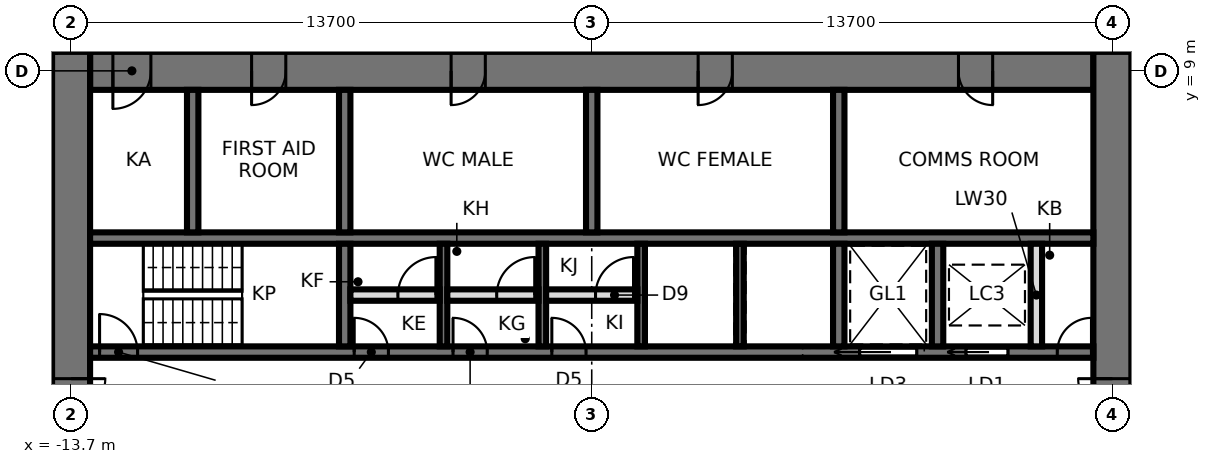
"""IFC4 building model, lengths in metres.
Left out: names, types, materials, properties, quantities, classifications, styles, units other than length and angle.
Written with IfcOpenShell. Run it as: python <this file> out.ifc"""

import sys

from ifc_helpers import new_model, si_unit, direction, frame, frame_2d, origin, place, context, subcontext, project, spatial, rectangle, extrude, element, fill, save


model = new_model("IFC4")
c1 = context("Model", 3, precision=1e-05, world=origin(), true_north=direction((0.0, 1.0)))
c2 = subcontext(c1, "Body", "Model", "MODEL_VIEW")
j1 = project(units=[si_unit("LENGTHUNIT", "METRE"), si_unit("PLANEANGLEUNIT", "RADIAN")], contexts=[c1])
p1 = place(None, origin())
s1 = spatial("IfcSite", under=j1, at=p1, CompositionType="ELEMENT")
p2 = place(p1, origin())
s2 = spatial("IfcBuilding", under=s1, at=p2, CompositionType="ELEMENT")
p3 = place(p2, frame((0.0, 0.0, 207.2)))
s3 = spatial("IfcBuildingStorey", under=s2, at=p3, CompositionType="ELEMENT", Elevation=207.2)
p4 = place(p3, frame((13.2, 9.0, 0.0), z_axis=(0.0, 0.0, 1.0), x_axis=(-1.0, 0.0, 0.0)))
e1 = element("IfcWall", 1, at=p4, inside=s3, PredefinedType="SHEAR", context=c2, shape_type="SweptSolid", body=[
    extrude(rectangle(XDim=26.4, YDim=1.0, at=frame_2d((13.2, 0.0))), origin(), (0.0, 0.0, 1.0), 3.9),
])
p5 = place(p4, frame((2.65, 0.0, 0.0)))
e2 = element("IfcOpeningElement", 2, at=p5, cuts=e1, PredefinedType="OPENING", context=c2, shape_type="SweptSolid", body=[
    extrude(rectangle(XDim=0.9, YDim=2.1, at=frame_2d((0.45, 1.05))), frame((0.0, 0.51, 0.0), z_axis=(0.0, -1.0, 0.0), x_axis=(1.0, 0.0, 0.0)), (0.0, 0.0, 1.0), 1.02),
])
p6 = place(p4, frame((9.5, 0.0, 0.0)))
e3 = element("IfcOpeningElement", 3, at=p6, cuts=e1, PredefinedType="OPENING", context=c2, shape_type="SweptSolid", body=[
    extrude(rectangle(XDim=0.9, YDim=2.1, at=frame_2d((0.45, 1.05))), frame((0.0, 0.51, 0.0), z_axis=(0.0, -1.0, 0.0), x_axis=(1.0, 0.0, 0.0)), (0.0, 0.0, 1.0), 1.02),
])
p7 = place(p4, frame((16.0, 0.0, 0.0)))
e4 = element("IfcOpeningElement", 4, at=p7, cuts=e1, PredefinedType="OPENING", context=c2, shape_type="SweptSolid", body=[
    extrude(rectangle(XDim=0.9, YDim=2.1, at=frame_2d((0.45, 1.05))), frame((0.0, 0.51, 0.0), z_axis=(0.0, -1.0, 0.0), x_axis=(1.0, 0.0, 0.0)), (0.0, 0.0, 1.0), 1.02),
])
p8 = place(p4, frame((21.25, 0.0, 0.0)))
e5 = element("IfcOpeningElement", 5, at=p8, cuts=e1, PredefinedType="OPENING", context=c2, shape_type="SweptSolid", body=[
    extrude(rectangle(XDim=0.9, YDim=2.1, at=frame_2d((0.45, 1.05))), frame((0.0, 0.51, 0.0), z_axis=(0.0, -1.0, 0.0), x_axis=(1.0, 0.0, 0.0)), (0.0, 0.0, 1.0), 1.02),
])
p9 = place(p4, frame((24.8, 0.0, 0.0)))
e6 = element("IfcOpeningElement", 6, at=p9, cuts=e1, PredefinedType="OPENING", context=c2, shape_type="SweptSolid", body=[
    extrude(rectangle(XDim=1.0, YDim=2.1, at=frame_2d((0.5, 1.05))), frame((0.0, 0.51, 0.0), z_axis=(0.0, -1.0, 0.0), x_axis=(1.0, 0.0, 0.0)), (0.0, 0.0, 1.0), 1.02),
])
p10 = place(p3, frame((13.7, -9.5, 0.0), z_axis=(0.0, 0.0, 1.0), x_axis=(0.0, 1.0, 0.0)))
e7 = element("IfcWall", 7, at=p10, inside=s3, PredefinedType="SHEAR", context=c2, shape_type="SweptSolid", body=[
    extrude(rectangle(XDim=19.0, YDim=1.0, at=frame_2d((9.5, 0.0))), origin(), (0.0, 0.0, 1.0), 3.9),
])
p11 = place(p10, frame((8.6, 0.0, 0.0)))
e8 = element("IfcOpeningElement", 8, at=p11, cuts=e7, PredefinedType="OPENING", context=c2, shape_type="SweptSolid", body=[
    extrude(rectangle(XDim=1.8, YDim=2.4, at=frame_2d((0.9, 1.2))), frame((0.0, 0.51, 0.0), z_axis=(0.0, -1.0, 0.0), x_axis=(1.0, 0.0, 0.0)), (0.0, 0.0, 1.0), 1.02),
])
p12 = place(p3, frame((-13.7, 9.5, 0.0), z_axis=(0.0, 0.0, 1.0), x_axis=(0.0, -1.0, 0.0)))
e9 = element("IfcWall", 9, at=p12, inside=s3, PredefinedType="SHEAR", context=c2, shape_type="SweptSolid", body=[
    extrude(rectangle(XDim=19.0, YDim=1.0, at=frame_2d((9.5, 0.0))), origin(), (0.0, 0.0, 1.0), 3.9),
])
p13 = place(p12, frame((8.6, 0.0, 0.0)))
e10 = element("IfcOpeningElement", 10, at=p13, cuts=e9, PredefinedType="OPENING", context=c2, shape_type="SweptSolid", body=[
    extrude(rectangle(XDim=1.8, YDim=2.4, at=frame_2d((0.9, 1.2))), frame((0.0, 0.51, 0.0), z_axis=(0.0, -1.0, 0.0), x_axis=(1.0, 0.0, 0.0)), (0.0, 0.0, 1.0), 1.02),
])
p14 = place(p3, frame((-13.2, 1.6, 0.0), z_axis=(0.0, 0.0, 1.0), x_axis=(1.0, 0.0, 0.0)))
e11 = element("IfcWall", 11, at=p14, inside=s3, PredefinedType="SHEAR", context=c2, shape_type="SweptSolid", body=[
    extrude(rectangle(XDim=26.4, YDim=0.3, at=frame_2d((13.2, 0.0))), origin(), (0.0, 0.0, 1.0), 3.9),
])
p15 = place(p14, frame((0.25, 0.0, 0.0)))
e12 = element("IfcOpeningElement", 12, at=p15, cuts=e11, PredefinedType="OPENING", context=c2, shape_type="SweptSolid", body=[
    extrude(rectangle(XDim=1.0, YDim=2.1, at=frame_2d((0.5, 1.05))), frame((0.0, 0.16, 0.0), z_axis=(0.0, -1.0, 0.0), x_axis=(1.0, 0.0, 0.0)), (0.0, 0.0, 1.0), 0.32),
])
p16 = place(p14, frame((23.05, 0.0, 0.0)))
e13 = element("IfcOpeningElement", 13, at=p16, cuts=e11, PredefinedType="OPENING", context=c2, shape_type="SweptSolid", body=[
    extrude(rectangle(XDim=1.1, YDim=2.3, at=frame_2d((0.55, 1.15))), frame((0.0, 0.16, 0.0), z_axis=(0.0, -1.0, 0.0), x_axis=(1.0, 0.0, 0.0)), (0.0, 0.0, 1.0), 0.32),
])
p17 = place(p14, frame((20.25, 0.0, 0.0)))
e14 = element("IfcOpeningElement", 14, at=p17, cuts=e11, PredefinedType="OPENING", context=c2, shape_type="SweptSolid", body=[
    extrude(rectangle(XDim=1.5, YDim=2.4, at=frame_2d((0.75, 1.2))), frame((0.0, 0.16, 0.0), z_axis=(0.0, -1.0, 0.0), x_axis=(1.0, 0.0, 0.0)), (0.0, 0.0, 1.0), 0.32),
])
p18 = place(p14, frame((6.95, 0.0, 0.0)))
e15 = element("IfcOpeningElement", 15, at=p18, cuts=e11, PredefinedType="OPENING", context=c2, shape_type="SweptSolid", body=[
    extrude(rectangle(XDim=0.9, YDim=2.1, at=frame_2d((0.45, 1.05))), frame((0.0, 0.16, 0.0), z_axis=(0.0, -1.0, 0.0), x_axis=(1.0, 0.0, 0.0)), (0.0, 0.0, 1.0), 0.32),
])
p19 = place(p14, frame((9.55, 0.0, 0.0)))
e16 = element("IfcOpeningElement", 16, at=p19, cuts=e11, PredefinedType="OPENING", context=c2, shape_type="SweptSolid", body=[
    extrude(rectangle(XDim=0.9, YDim=2.1, at=frame_2d((0.45, 1.05))), frame((0.0, 0.16, 0.0), z_axis=(0.0, -1.0, 0.0), x_axis=(1.0, 0.0, 0.0)), (0.0, 0.0, 1.0), 0.32),
])
p20 = place(p14, frame((12.15, 0.0, 0.0)))
e17 = element("IfcOpeningElement", 17, at=p20, cuts=e11, PredefinedType="OPENING", context=c2, shape_type="SweptSolid", body=[
    extrude(rectangle(XDim=0.9, YDim=2.1, at=frame_2d((0.45, 1.05))), frame((0.0, 0.16, 0.0), z_axis=(0.0, -1.0, 0.0), x_axis=(1.0, 0.0, 0.0)), (0.0, 0.0, 1.0), 0.32),
])
p21 = place(p14, frame((25.45, 0.0, 0.0)))
e18 = element("IfcOpeningElement", 18, at=p21, cuts=e11, PredefinedType="OPENING", context=c2, shape_type="SweptSolid", body=[
    extrude(rectangle(XDim=0.9, YDim=2.1, at=frame_2d((0.45, 1.05))), frame((0.0, 0.16, 0.0), z_axis=(0.0, -1.0, 0.0), x_axis=(1.0, 0.0, 0.0)), (0.0, 0.0, 1.0), 0.32),
])
p22 = place(p3, frame((-13.2, 4.6, 0.0), z_axis=(0.0, 0.0, 1.0), x_axis=(1.0, 0.0, 0.0)))
e19 = element("IfcWall", 19, at=p22, inside=s3, PredefinedType="SHEAR", context=c2, shape_type="SweptSolid", body=[
    extrude(rectangle(XDim=26.4, YDim=0.3, at=frame_2d((13.2, 0.0))), origin(), (0.0, 0.0, 1.0), 3.9),
])
p23 = place(p3, frame((-6.5, 1.75, 0.0), z_axis=(0.0, 0.0, 1.0), x_axis=(0.0, 1.0, 0.0)))
e20 = element("IfcWall", 20, at=p23, inside=s3, PredefinedType="SHEAR", context=c2, shape_type="SweptSolid", body=[
    extrude(rectangle(XDim=2.7, YDim=0.3, at=frame_2d((1.35, 0.0))), origin(), (0.0, 0.0, 1.0), 3.9),
])
p24 = place(p3, frame((-6.5, 4.75, 0.0), z_axis=(0.0, 0.0, 1.0), x_axis=(0.0, 1.0, 0.0)))
e21 = element("IfcWall", 21, at=p24, inside=s3, PredefinedType="SHEAR", context=c2, shape_type="SweptSolid", body=[
    extrude(rectangle(XDim=3.75, YDim=0.3, at=frame_2d((1.875, 0.0))), origin(), (0.0, 0.0, 1.0), 3.9),
])
p25 = place(p3, frame((6.5, 1.75, 0.0), z_axis=(0.0, 0.0, 1.0), x_axis=(0.0, 1.0, 0.0)))
e22 = element("IfcWall", 22, at=p25, inside=s3, PredefinedType="SHEAR", context=c2, shape_type="SweptSolid", body=[
    extrude(rectangle(XDim=2.7, YDim=0.3, at=frame_2d((1.35, 0.0))), origin(), (0.0, 0.0, 1.0), 3.9),
])
p26 = place(p3, frame((6.5, 4.75, 0.0), z_axis=(0.0, 0.0, 1.0), x_axis=(0.0, 1.0, 0.0)))
e23 = element("IfcWall", 23, at=p26, inside=s3, PredefinedType="SHEAR", context=c2, shape_type="SweptSolid", body=[
    extrude(rectangle(XDim=3.75, YDim=0.3, at=frame_2d((1.875, 0.0))), origin(), (0.0, 0.0, 1.0), 3.9),
])
for number, where, z_axis, x_axis in (
    (24, (-3.9, 1.75, 0.0), (0.0, 0.0, 1.0), (0.0, 1.0, 0.0)),
    (25, (-1.3, 1.75, 0.0), (0.0, 0.0, 1.0), (0.0, 1.0, 0.0)),
    (26, (1.3, 1.75, 0.0), (0.0, 0.0, 1.0), (0.0, 1.0, 0.0)),
    (27, (3.9, 1.75, 0.0), (0.0, 0.0, 1.0), (0.0, 1.0, 0.0)),
):
    element("IfcWall", number, at=place(p3, frame(where, z_axis=z_axis, x_axis=x_axis)), inside=s3, PredefinedType="SHEAR", context=c2, shape_type="SweptSolid", body=[
        extrude(rectangle(XDim=2.7, YDim=0.2, at=frame_2d((1.35, 0.0))), origin(), (0.0, 0.0, 1.0), 3.9),
    ])
for number, where, z_axis, x_axis in (
    (28, (0.0, 4.75, 0.0), (0.0, 0.0, 1.0), (0.0, 1.0, 0.0)),
    (29, (-10.5, 4.75, 0.0), (0.0, 0.0, 1.0), (0.0, 1.0, 0.0)),
):
    element("IfcWall", number, at=place(p3, frame(where, z_axis=z_axis, x_axis=x_axis)), inside=s3, PredefinedType="SHEAR", context=c2, shape_type="SweptSolid", body=[
        extrude(rectangle(XDim=3.75, YDim=0.3, at=frame_2d((1.875, 0.0))), origin(), (0.0, 0.0, 1.0), 3.9),
    ])
p27 = place(p3, frame((9.1, 1.75, 0.0), z_axis=(0.0, 0.0, 1.0), x_axis=(0.0, 1.0, 0.0)))
e30 = element("IfcWall", 30, at=p27, inside=s3, PredefinedType="SHEAR", context=c2, shape_type="SweptSolid", body=[
    extrude(rectangle(XDim=2.7, YDim=0.3, at=frame_2d((1.35, 0.0))), origin(), (0.0, 0.0, 1.0), 3.9),
])
p28 = place(p3, frame((-6.35, 3.1, 0.0), z_axis=(0.0, 0.0, 1.0), x_axis=(1.0, 0.0, 0.0)))
e31 = element("IfcWall", 31, at=p28, inside=s3, PredefinedType="PARTITIONING", context=c2, shape_type="SweptSolid", body=[
    extrude(rectangle(XDim=2.35, YDim=0.3, at=frame_2d((1.175, 0.0))), origin(), (0.0, 0.0, 1.0), 3.74),
])
p29 = place(p28, frame((1.25, 0.0, 0.0)))
e32 = element("IfcOpeningElement", 32, at=p29, cuts=e31, PredefinedType="OPENING", context=c2, shape_type="SweptSolid", body=[
    extrude(rectangle(XDim=1.0, YDim=2.4, at=frame_2d((0.5, 1.2))), frame((0.0, 0.16, 0.0), z_axis=(0.0, -1.0, 0.0), x_axis=(1.0, 0.0, 0.0)), (0.0, 0.0, 1.0), 0.32),
])
p30 = place(p3, frame((-3.8, 3.1, 0.0), z_axis=(0.0, 0.0, 1.0), x_axis=(1.0, 0.0, 0.0)))
e33 = element("IfcWall", 33, at=p30, inside=s3, PredefinedType="PARTITIONING", context=c2, shape_type="SweptSolid", body=[
    extrude(rectangle(XDim=2.4, YDim=0.3, at=frame_2d((1.2, 0.0))), origin(), (0.0, 0.0, 1.0), 3.74),
])
p31 = place(p30, frame((1.3, 0.0, 0.0)))
e34 = element("IfcOpeningElement", 34, at=p31, cuts=e33, PredefinedType="OPENING", context=c2, shape_type="SweptSolid", body=[
    extrude(rectangle(XDim=1.0, YDim=2.4, at=frame_2d((0.5, 1.2))), frame((0.0, 0.16, 0.0), z_axis=(0.0, -1.0, 0.0), x_axis=(1.0, 0.0, 0.0)), (0.0, 0.0, 1.0), 0.32),
])
p32 = place(p3, frame((-1.2, 3.1, 0.0), z_axis=(0.0, 0.0, 1.0), x_axis=(1.0, 0.0, 0.0)))
e35 = element("IfcWall", 35, at=p32, inside=s3, PredefinedType="PARTITIONING", context=c2, shape_type="SweptSolid", body=[
    extrude(rectangle(XDim=2.4, YDim=0.3, at=frame_2d((1.2, 0.0))), origin(), (0.0, 0.0, 1.0), 3.74),
])
p33 = place(p32, frame((1.3, 0.0, 0.0)))
e36 = element("IfcOpeningElement", 36, at=p33, cuts=e35, PredefinedType="OPENING", context=c2, shape_type="SweptSolid", body=[
    extrude(rectangle(XDim=1.0, YDim=2.4, at=frame_2d((0.5, 1.2))), frame((0.0, 0.16, 0.0), z_axis=(0.0, -1.0, 0.0), x_axis=(1.0, 0.0, 0.0)), (0.0, 0.0, 1.0), 0.32),
])
p34 = place(p3, frame((11.7, 1.75, 0.0), z_axis=(0.0, 0.0, 1.0), x_axis=(0.0, 1.0, 0.0)))
e37 = element("IfcWall", 37, at=p34, inside=s3, PredefinedType="SOLIDWALL", context=c2, shape_type="SweptSolid", body=[
    extrude(rectangle(XDim=2.7, YDim=0.3, at=frame_2d((1.35, 0.0))), origin(), (0.0, 0.0, 1.0), 3.74),
])
p35 = place(p13, origin())
e38 = element("IfcDoor", 38, at=p35, inside=s3, OperationType="DOUBLE_DOOR_SINGLE_SWING", PredefinedType="DOOR", context=c2, shape_type="SweptSolid", body=[
    extrude(rectangle(XDim=1.72, YDim=2.36, at=frame_2d((0.9, 1.18))), frame((0.0, 0.025, 0.0), z_axis=(0.0, -1.0, 0.0), x_axis=(1.0, 0.0, 0.0)), (0.0, 0.0, 1.0), 0.05),
    extrude(rectangle(XDim=0.04, YDim=2.4, at=frame_2d((0.02, 1.2))), frame((0.0, 0.25, 0.0), z_axis=(0.0, -1.0, 0.0), x_axis=(1.0, 0.0, 0.0)), (0.0, 0.0, 1.0), 0.5),
    extrude(rectangle(XDim=0.04, YDim=2.4, at=frame_2d((1.78, 1.2))), frame((0.0, 0.25, 0.0), z_axis=(0.0, -1.0, 0.0), x_axis=(1.0, 0.0, 0.0)), (0.0, 0.0, 1.0), 0.5),
    extrude(rectangle(XDim=1.72, YDim=0.04, at=frame_2d((0.9, 2.38))), frame((0.0, 0.25, 0.0), z_axis=(0.0, -1.0, 0.0), x_axis=(1.0, 0.0, 0.0)), (0.0, 0.0, 1.0), 0.5),
])
fill(e10, e38)
p36 = place(p11, origin())
e39 = element("IfcDoor", 39, at=p36, inside=s3, OperationType="DOUBLE_DOOR_SINGLE_SWING", PredefinedType="DOOR", context=c2, shape_type="SweptSolid", body=[
    extrude(rectangle(XDim=1.72, YDim=2.36, at=frame_2d((0.9, 1.18))), frame((0.0, 0.025, 0.0), z_axis=(0.0, -1.0, 0.0), x_axis=(1.0, 0.0, 0.0)), (0.0, 0.0, 1.0), 0.05),
    extrude(rectangle(XDim=0.04, YDim=2.4, at=frame_2d((0.02, 1.2))), frame((0.0, 0.25, 0.0), z_axis=(0.0, -1.0, 0.0), x_axis=(1.0, 0.0, 0.0)), (0.0, 0.0, 1.0), 0.5),
    extrude(rectangle(XDim=0.04, YDim=2.4, at=frame_2d((1.78, 1.2))), frame((0.0, 0.25, 0.0), z_axis=(0.0, -1.0, 0.0), x_axis=(1.0, 0.0, 0.0)), (0.0, 0.0, 1.0), 0.5),
    extrude(rectangle(XDim=1.72, YDim=0.04, at=frame_2d((0.9, 2.38))), frame((0.0, 0.25, 0.0), z_axis=(0.0, -1.0, 0.0), x_axis=(1.0, 0.0, 0.0)), (0.0, 0.0, 1.0), 0.5),
])
fill(e8, e39)
p37 = place(p15, origin())
e40 = element("IfcDoor", 40, at=p37, inside=s3, OperationType="SINGLE_SWING_LEFT", PredefinedType="DOOR", context=c2, shape_type="SweptSolid", body=[
    extrude(rectangle(XDim=1.0, YDim=2.1, at=frame_2d((0.5, 1.05))), frame((0.0, 0.025, 0.0), z_axis=(0.0, -1.0, 0.0), x_axis=(1.0, 0.0, 0.0)), (0.0, 0.0, 1.0), 0.05),
])
fill(e12, e40)
p38 = place(p16, origin())
e41 = element("IfcDoor", 41, at=p38, inside=s3, OperationType="SLIDING_TO_LEFT", PredefinedType="DOOR", context=c2, shape_type="SweptSolid", body=[
    extrude(rectangle(XDim=1.1, YDim=2.3, at=frame_2d((0.55, 1.15))), frame((0.0, 0.025, 0.0), z_axis=(0.0, -1.0, 0.0), x_axis=(1.0, 0.0, 0.0)), (0.0, 0.0, 1.0), 0.05),
])
fill(e13, e41)
p39 = place(p17, origin())
e42 = element("IfcDoor", 42, at=p39, inside=s3, OperationType="SLIDING_TO_LEFT", PredefinedType="DOOR", context=c2, shape_type="SweptSolid", body=[
    extrude(rectangle(XDim=1.5, YDim=2.4, at=frame_2d((0.75, 1.2))), frame((0.0, 0.025, 0.0), z_axis=(0.0, -1.0, 0.0), x_axis=(1.0, 0.0, 0.0)), (0.0, 0.0, 1.0), 0.05),
])
fill(e14, e42)
p40 = place(p29, origin())
e43 = element("IfcDoor", 43, at=p40, inside=s3, OperationType="SINGLE_SWING_RIGHT", PredefinedType="DOOR", context=c2, shape_type="SweptSolid", body=[
    extrude(rectangle(XDim=1.0, YDim=2.4, at=frame_2d((0.5, 1.2))), frame((0.0, 0.025, 0.0), z_axis=(0.0, -1.0, 0.0), x_axis=(1.0, 0.0, 0.0)), (0.0, 0.0, 1.0), 0.05),
])
fill(e32, e43)
p41 = place(p18, origin())
e44 = element("IfcDoor", 44, at=p41, inside=s3, OperationType="SINGLE_SWING_LEFT", PredefinedType="DOOR", context=c2, shape_type="SweptSolid", body=[
    extrude(rectangle(XDim=0.9, YDim=2.1, at=frame_2d((0.45, 1.05))), frame((0.0, 0.025, 0.0), z_axis=(0.0, -1.0, 0.0), x_axis=(1.0, 0.0, 0.0)), (0.0, 0.0, 1.0), 0.05),
])
fill(e15, e44)
p42 = place(p31, origin())
e45 = element("IfcDoor", 45, at=p42, inside=s3, OperationType="SINGLE_SWING_RIGHT", PredefinedType="DOOR", context=c2, shape_type="SweptSolid", body=[
    extrude(rectangle(XDim=1.0, YDim=2.4, at=frame_2d((0.5, 1.2))), frame((0.0, 0.025, 0.0), z_axis=(0.0, -1.0, 0.0), x_axis=(1.0, 0.0, 0.0)), (0.0, 0.0, 1.0), 0.05),
])
fill(e34, e45)
p43 = place(p19, origin())
e46 = element("IfcDoor", 46, at=p43, inside=s3, OperationType="SINGLE_SWING_LEFT", PredefinedType="DOOR", context=c2, shape_type="SweptSolid", body=[
    extrude(rectangle(XDim=0.9, YDim=2.1, at=frame_2d((0.45, 1.05))), frame((0.0, 0.025, 0.0), z_axis=(0.0, -1.0, 0.0), x_axis=(1.0, 0.0, 0.0)), (0.0, 0.0, 1.0), 0.05),
])
fill(e16, e46)
p44 = place(p33, origin())
e47 = element("IfcDoor", 47, at=p44, inside=s3, OperationType="SINGLE_SWING_RIGHT", PredefinedType="DOOR", context=c2, shape_type="SweptSolid", body=[
    extrude(rectangle(XDim=1.0, YDim=2.4, at=frame_2d((0.5, 1.2))), frame((0.0, 0.025, 0.0), z_axis=(0.0, -1.0, 0.0), x_axis=(1.0, 0.0, 0.0)), (0.0, 0.0, 1.0), 0.05),
])
fill(e36, e47)
p45 = place(p20, origin())
e48 = element("IfcDoor", 48, at=p45, inside=s3, OperationType="SINGLE_SWING_LEFT", PredefinedType="DOOR", context=c2, shape_type="SweptSolid", body=[
    extrude(rectangle(XDim=0.9, YDim=2.1, at=frame_2d((0.45, 1.05))), frame((0.0, 0.025, 0.0), z_axis=(0.0, -1.0, 0.0), x_axis=(1.0, 0.0, 0.0)), (0.0, 0.0, 1.0), 0.05),
])
fill(e17, e48)
p46 = place(p21, origin())
e49 = element("IfcDoor", 49, at=p46, inside=s3, OperationType="SINGLE_SWING_RIGHT", PredefinedType="DOOR", context=c2, shape_type="SweptSolid", body=[
    extrude(rectangle(XDim=0.9, YDim=2.1, at=frame_2d((0.45, 1.05))), frame((0.0, 0.025, 0.0), z_axis=(0.0, -1.0, 0.0), x_axis=(1.0, 0.0, 0.0)), (0.0, 0.0, 1.0), 0.05),
])
fill(e18, e49)
p47 = place(p5, origin())
e50 = element("IfcDoor", 50, at=p47, inside=s3, OperationType="SINGLE_SWING_LEFT", PredefinedType="DOOR", context=c2, shape_type="SweptSolid", body=[
    extrude(rectangle(XDim=0.82, YDim=2.06, at=frame_2d((0.45, 1.03))), frame((0.0, 0.025, 0.0), z_axis=(0.0, -1.0, 0.0), x_axis=(1.0, 0.0, 0.0)), (0.0, 0.0, 1.0), 0.05),
    extrude(rectangle(XDim=0.04, YDim=2.1, at=frame_2d((0.02, 1.05))), frame((0.0, 0.25, 0.0), z_axis=(0.0, -1.0, 0.0), x_axis=(1.0, 0.0, 0.0)), (0.0, 0.0, 1.0), 0.5),
    extrude(rectangle(XDim=0.04, YDim=2.1, at=frame_2d((0.88, 1.05))), frame((0.0, 0.25, 0.0), z_axis=(0.0, -1.0, 0.0), x_axis=(1.0, 0.0, 0.0)), (0.0, 0.0, 1.0), 0.5),
    extrude(rectangle(XDim=0.82, YDim=0.04, at=frame_2d((0.45, 2.08))), frame((0.0, 0.25, 0.0), z_axis=(0.0, -1.0, 0.0), x_axis=(1.0, 0.0, 0.0)), (0.0, 0.0, 1.0), 0.5),
])
fill(e2, e50)
p48 = place(p6, origin())
e51 = element("IfcDoor", 51, at=p48, inside=s3, OperationType="SINGLE_SWING_RIGHT", PredefinedType="DOOR", context=c2, shape_type="SweptSolid", body=[
    extrude(rectangle(XDim=0.82, YDim=2.06, at=frame_2d((0.45, 1.03))), frame((0.0, 0.025, 0.0), z_axis=(0.0, -1.0, 0.0), x_axis=(1.0, 0.0, 0.0)), (0.0, 0.0, 1.0), 0.05),
    extrude(rectangle(XDim=0.04, YDim=2.1, at=frame_2d((0.02, 1.05))), frame((0.0, 0.25, 0.0), z_axis=(0.0, -1.0, 0.0), x_axis=(1.0, 0.0, 0.0)), (0.0, 0.0, 1.0), 0.5),
    extrude(rectangle(XDim=0.04, YDim=2.1, at=frame_2d((0.88, 1.05))), frame((0.0, 0.25, 0.0), z_axis=(0.0, -1.0, 0.0), x_axis=(1.0, 0.0, 0.0)), (0.0, 0.0, 1.0), 0.5),
    extrude(rectangle(XDim=0.82, YDim=0.04, at=frame_2d((0.45, 2.08))), frame((0.0, 0.25, 0.0), z_axis=(0.0, -1.0, 0.0), x_axis=(1.0, 0.0, 0.0)), (0.0, 0.0, 1.0), 0.5),
])
fill(e3, e51)
p49 = place(p7, origin())
e52 = element("IfcDoor", 52, at=p49, inside=s3, OperationType="SINGLE_SWING_RIGHT", PredefinedType="DOOR", context=c2, shape_type="SweptSolid", body=[
    extrude(rectangle(XDim=0.82, YDim=2.06, at=frame_2d((0.45, 1.03))), frame((0.0, 0.025, 0.0), z_axis=(0.0, -1.0, 0.0), x_axis=(1.0, 0.0, 0.0)), (0.0, 0.0, 1.0), 0.05),
    extrude(rectangle(XDim=0.04, YDim=2.1, at=frame_2d((0.02, 1.05))), frame((0.0, 0.25, 0.0), z_axis=(0.0, -1.0, 0.0), x_axis=(1.0, 0.0, 0.0)), (0.0, 0.0, 1.0), 0.5),
    extrude(rectangle(XDim=0.04, YDim=2.1, at=frame_2d((0.88, 1.05))), frame((0.0, 0.25, 0.0), z_axis=(0.0, -1.0, 0.0), x_axis=(1.0, 0.0, 0.0)), (0.0, 0.0, 1.0), 0.5),
    extrude(rectangle(XDim=0.82, YDim=0.04, at=frame_2d((0.45, 2.08))), frame((0.0, 0.25, 0.0), z_axis=(0.0, -1.0, 0.0), x_axis=(1.0, 0.0, 0.0)), (0.0, 0.0, 1.0), 0.5),
])
fill(e4, e52)
p50 = place(p8, origin())
e53 = element("IfcDoor", 53, at=p50, inside=s3, OperationType="SINGLE_SWING_RIGHT", PredefinedType="DOOR", context=c2, shape_type="SweptSolid", body=[
    extrude(rectangle(XDim=0.82, YDim=2.06, at=frame_2d((0.45, 1.03))), frame((0.0, 0.025, 0.0), z_axis=(0.0, -1.0, 0.0), x_axis=(1.0, 0.0, 0.0)), (0.0, 0.0, 1.0), 0.05),
    extrude(rectangle(XDim=0.04, YDim=2.1, at=frame_2d((0.02, 1.05))), frame((0.0, 0.25, 0.0), z_axis=(0.0, -1.0, 0.0), x_axis=(1.0, 0.0, 0.0)), (0.0, 0.0, 1.0), 0.5),
    extrude(rectangle(XDim=0.04, YDim=2.1, at=frame_2d((0.88, 1.05))), frame((0.0, 0.25, 0.0), z_axis=(0.0, -1.0, 0.0), x_axis=(1.0, 0.0, 0.0)), (0.0, 0.0, 1.0), 0.5),
    extrude(rectangle(XDim=0.82, YDim=0.04, at=frame_2d((0.45, 2.08))), frame((0.0, 0.25, 0.0), z_axis=(0.0, -1.0, 0.0), x_axis=(1.0, 0.0, 0.0)), (0.0, 0.0, 1.0), 0.5),
])
fill(e5, e53)
p51 = place(p9, origin())
e54 = element("IfcDoor", 54, at=p51, inside=s3, OperationType="SINGLE_SWING_RIGHT", PredefinedType="DOOR", context=c2, shape_type="SweptSolid", body=[
    extrude(rectangle(XDim=0.92, YDim=2.06, at=frame_2d((0.5, 1.03))), frame((0.0, 0.025, 0.0), z_axis=(0.0, -1.0, 0.0), x_axis=(1.0, 0.0, 0.0)), (0.0, 0.0, 1.0), 0.05),
    extrude(rectangle(XDim=0.04, YDim=2.1, at=frame_2d((0.02, 1.05))), frame((0.0, 0.25, 0.0), z_axis=(0.0, -1.0, 0.0), x_axis=(1.0, 0.0, 0.0)), (0.0, 0.0, 1.0), 0.5),
    extrude(rectangle(XDim=0.04, YDim=2.1, at=frame_2d((0.98, 1.05))), frame((0.0, 0.25, 0.0), z_axis=(0.0, -1.0, 0.0), x_axis=(1.0, 0.0, 0.0)), (0.0, 0.0, 1.0), 0.5),
    extrude(rectangle(XDim=0.92, YDim=0.04, at=frame_2d((0.5, 2.08))), frame((0.0, 0.25, 0.0), z_axis=(0.0, -1.0, 0.0), x_axis=(1.0, 0.0, 0.0)), (0.0, 0.0, 1.0), 0.5),
])
fill(e6, e54)
save(model, sys.argv[1])
